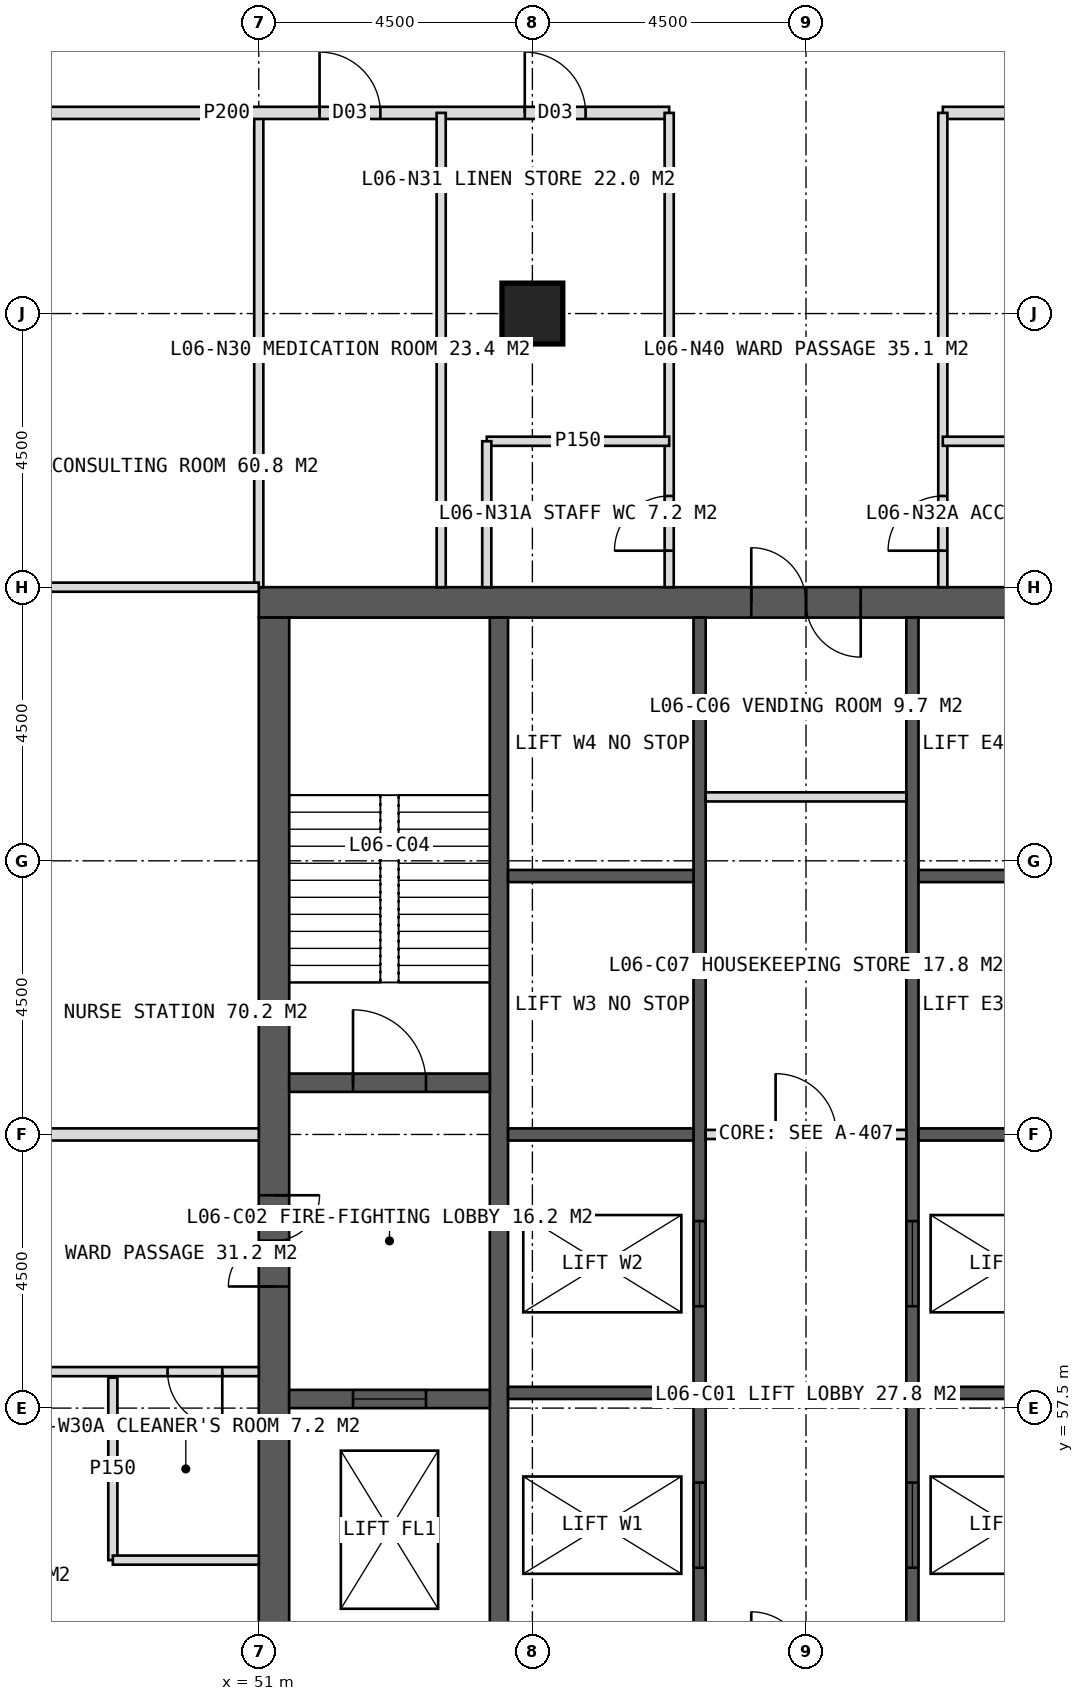
"""IFC4 building model, lengths in metres.
Left out: names, types, materials, properties, quantities, classifications, styles, units other than length and angle.
Written with IfcOpenShell. Run it as: python <this file> out.ifc"""

import sys

from ifc_helpers import new_model, si_unit, direction, frame, frame_2d, origin, origin_2d, place, context, subcontext, project, spatial, rectangle, hollow_rectangle, extrude, element, fill, save


model = new_model("IFC4")
c1 = context("Model", 3, precision=1e-05, world=origin(), true_north=direction((0.0, 1.0)))
c2 = subcontext(c1, "Body", "Model", "MODEL_VIEW")
j1 = project(units=[si_unit("LENGTHUNIT", "METRE"), si_unit("PLANEANGLEUNIT", "RADIAN")], contexts=[c1])
p1 = place(None, origin())
s1 = spatial("IfcSite", under=j1, at=p1, CompositionType="ELEMENT")
p2 = place(p1, origin())
s2 = spatial("IfcBuilding", under=s1, at=p2, CompositionType="ELEMENT")
p3 = place(p2, frame((0.0, 0.0, 31.0)))
s3 = spatial("IfcBuildingStorey", under=s2, at=p3, CompositionType="ELEMENT", Elevation=31.0)
p4 = place(p3, frame((51.0, 70.75, 0.0), z_axis=(0.0, 0.0, 1.0), x_axis=(1.0, 0.0, 0.0)))
e1 = element("IfcWall", 1, at=p4, inside=s3, PredefinedType="SHEAR", context=c2, shape_type="SweptSolid", body=[
    extrude(rectangle(XDim=18.0, YDim=0.5, at=frame_2d((9.0, 0.0))), origin(), (0.0, 0.0, 1.0), 4.0),
])
p5 = place(p4, frame((8.1, 0.0, 0.0)))
e2 = element("IfcOpeningElement", 2, at=p5, cuts=e1, PredefinedType="OPENING", context=c2, shape_type="SweptSolid", body=[
    extrude(rectangle(XDim=1.8, YDim=2.2, at=frame_2d((0.9, 1.1))), frame((0.0, 0.26, 0.0), z_axis=(0.0, -1.0, 0.0), x_axis=(1.0, 0.0, 0.0)), (0.0, 0.0, 1.0), 0.52),
])
p6 = place(p3, frame((51.25, 53.5, 0.0), z_axis=(0.0, 0.0, 1.0), x_axis=(0.0, 1.0, 0.0)))
e3 = element("IfcWall", 3, at=p6, inside=s3, PredefinedType="SHEAR", context=c2, shape_type="SweptSolid", body=[
    extrude(rectangle(XDim=17.0, YDim=0.5, at=frame_2d((8.5, 0.0))), origin(), (0.0, 0.0, 1.0), 4.0),
])
p7 = place(p6, frame((6.0, 0.0, 0.0)))
e4 = element("IfcOpeningElement", 4, at=p7, cuts=e3, PredefinedType="OPENING", context=c2, shape_type="SweptSolid", body=[
    extrude(rectangle(XDim=1.5, YDim=2.2, at=frame_2d((0.75, 1.1))), frame((0.0, 0.26, 0.0), z_axis=(0.0, -1.0, 0.0), x_axis=(1.0, 0.0, 0.0)), (0.0, 0.0, 1.0), 0.52),
])
p8 = place(p3, frame((54.95, 53.5, 0.0), z_axis=(0.0, 0.0, 1.0), x_axis=(0.0, 1.0, 0.0)))
e5 = element("IfcWall", 5, at=p8, inside=s3, PredefinedType="SHEAR", context=c2, shape_type="SweptSolid", body=[
    extrude(rectangle(XDim=17.0, YDim=0.3, at=frame_2d((8.5, 0.0))), origin(), (0.0, 0.0, 1.0), 4.0),
])
p9 = place(p3, frame((58.25, 53.5, 0.0), z_axis=(0.0, 0.0, 1.0), x_axis=(0.0, 1.0, 0.0)))
e6 = element("IfcWall", 6, at=p9, inside=s3, PredefinedType="SHEAR", context=c2, shape_type="SweptSolid", body=[
    extrude(rectangle(XDim=17.0, YDim=0.2, at=frame_2d((8.5, 0.0))), origin(), (0.0, 0.0, 1.0), 4.0),
])
p10 = place(p9, frame((1.375, 0.0, 0.0)))
e7 = element("IfcOpeningElement", 7, at=p10, cuts=e6, PredefinedType="OPENING", context=c2, shape_type="SweptSolid", body=[
    extrude(rectangle(XDim=1.4, YDim=2.2, at=frame_2d((0.7, 1.1))), frame((0.0, 0.11, 0.0), z_axis=(0.0, -1.0, 0.0), x_axis=(1.0, 0.0, 0.0)), (0.0, 0.0, 1.0), 0.22),
])
p11 = place(p9, frame((5.675, 0.0, 0.0)))
e8 = element("IfcOpeningElement", 8, at=p11, cuts=e6, PredefinedType="OPENING", context=c2, shape_type="SweptSolid", body=[
    extrude(rectangle(XDim=1.4, YDim=2.2, at=frame_2d((0.7, 1.1))), frame((0.0, 0.11, 0.0), z_axis=(0.0, -1.0, 0.0), x_axis=(1.0, 0.0, 0.0)), (0.0, 0.0, 1.0), 0.22),
])
p12 = place(p3, frame((61.75, 53.5, 0.0), z_axis=(0.0, 0.0, 1.0), x_axis=(0.0, 1.0, 0.0)))
e9 = element("IfcWall", 9, at=p12, inside=s3, PredefinedType="SHEAR", context=c2, shape_type="SweptSolid", body=[
    extrude(rectangle(XDim=17.0, YDim=0.2, at=frame_2d((8.5, 0.0))), origin(), (0.0, 0.0, 1.0), 4.0),
])
p13 = place(p12, frame((1.375, 0.0, 0.0)))
e10 = element("IfcOpeningElement", 10, at=p13, cuts=e9, PredefinedType="OPENING", context=c2, shape_type="SweptSolid", body=[
    extrude(rectangle(XDim=1.4, YDim=2.2, at=frame_2d((0.7, 1.1))), frame((0.0, 0.11, 0.0), z_axis=(0.0, -1.0, 0.0), x_axis=(1.0, 0.0, 0.0)), (0.0, 0.0, 1.0), 0.22),
])
p14 = place(p12, frame((5.675, 0.0, 0.0)))
e11 = element("IfcOpeningElement", 11, at=p14, cuts=e9, PredefinedType="OPENING", context=c2, shape_type="SweptSolid", body=[
    extrude(rectangle(XDim=1.4, YDim=2.2, at=frame_2d((0.7, 1.1))), frame((0.0, 0.11, 0.0), z_axis=(0.0, -1.0, 0.0), x_axis=(1.0, 0.0, 0.0)), (0.0, 0.0, 1.0), 0.22),
])
for number, where, z_axis, x_axis in (
    (12, (55.1, 57.75, 0.0), (0.0, 0.0, 1.0), (1.0, 0.0, 0.0)),
    (13, (61.85, 57.75, 0.0), (0.0, 0.0, 1.0), (1.0, 0.0, 0.0)),
    (14, (55.1, 62.0, 0.0), (0.0, 0.0, 1.0), (1.0, 0.0, 0.0)),
    (15, (61.85, 62.0, 0.0), (0.0, 0.0, 1.0), (1.0, 0.0, 0.0)),
    (16, (55.1, 66.25, 0.0), (0.0, 0.0, 1.0), (1.0, 0.0, 0.0)),
    (17, (61.85, 66.25, 0.0), (0.0, 0.0, 1.0), (1.0, 0.0, 0.0)),
):
    element("IfcWall", number, at=place(p3, frame(where, z_axis=z_axis, x_axis=x_axis)), inside=s3, PredefinedType="SHEAR", context=c2, shape_type="SweptSolid", body=[
        extrude(rectangle(XDim=3.05, YDim=0.2, at=frame_2d((1.525, 0.0))), origin(), (0.0, 0.0, 1.0), 4.0),
    ])
p15 = place(p3, frame((51.5, 62.85, 0.0), z_axis=(0.0, 0.0, 1.0), x_axis=(1.0, 0.0, 0.0)))
e18 = element("IfcWall", 18, at=p15, inside=s3, PredefinedType="SHEAR", context=c2, shape_type="SweptSolid", body=[
    extrude(rectangle(XDim=3.3, YDim=0.3, at=frame_2d((1.65, 0.0))), origin(), (0.0, 0.0, 1.0), 4.0),
])
p16 = place(p15, frame((1.05, 0.0, 0.0)))
e19 = element("IfcOpeningElement", 19, at=p16, cuts=e18, PredefinedType="OPENING", context=c2, shape_type="SweptSolid", body=[
    extrude(rectangle(XDim=1.2, YDim=2.1, at=frame_2d((0.6, 1.05))), frame((0.0, 0.16, 0.0), z_axis=(0.0, -1.0, 0.0), x_axis=(1.0, 0.0, 0.0)), (0.0, 0.0, 1.0), 0.32),
])
p17 = place(p3, frame((51.5, 57.65, 0.0), z_axis=(0.0, 0.0, 1.0), x_axis=(1.0, 0.0, 0.0)))
e20 = element("IfcWall", 20, at=p17, inside=s3, PredefinedType="SHEAR", context=c2, shape_type="SweptSolid", body=[
    extrude(rectangle(XDim=3.3, YDim=0.3, at=frame_2d((1.65, 0.0))), origin(), (0.0, 0.0, 1.0), 4.0),
])
p18 = place(p17, frame((1.05, 0.0, 0.0)))
e21 = element("IfcOpeningElement", 21, at=p18, cuts=e20, PredefinedType="OPENING", context=c2, shape_type="SweptSolid", body=[
    extrude(rectangle(XDim=1.2, YDim=2.2, at=frame_2d((0.6, 1.1))), frame((0.0, 0.16, 0.0), z_axis=(0.0, -1.0, 0.0), x_axis=(1.0, 0.0, 0.0)), (0.0, 0.0, 1.0), 0.32),
])
p19 = place(p3, frame((55.5, 75.5, 0.0), z_axis=(0.0, 0.0, 1.0), x_axis=(1.0, 0.0, 0.0)))
e22 = element("IfcColumn", 22, at=p19, inside=s3, PredefinedType="COLUMN", context=c2, shape_type="SweptSolid", body=[
    extrude(hollow_rectangle(XDim=1.0, YDim=1.0, WallThickness=0.1, at=origin_2d()), origin(), (0.0, 0.0, 1.0), 4.0),
])
p20 = place(p3, frame((51.0, 71.0, 0.0), z_axis=(0.0, 0.0, 1.0), x_axis=(0.0, 1.0, 0.0)))
e23 = element("IfcWall", 23, at=p20, inside=s3, PredefinedType="PARTITIONING", context=c2, shape_type="SweptSolid", body=[
    extrude(rectangle(XDim=7.8, YDim=0.15, at=frame_2d((3.9, 0.0))), origin(), (0.0, 0.0, 1.0), 3.75),
])
p21 = place(p3, frame((43.2, 78.8, 0.0), z_axis=(0.0, 0.0, 1.0), x_axis=(1.0, 0.0, 0.0)))
e24 = element("IfcWall", 24, at=p21, inside=s3, PredefinedType="PARTITIONING", context=c2, shape_type="SweptSolid", body=[
    extrude(rectangle(XDim=14.55, YDim=0.2, at=frame_2d((7.275, 0.0))), origin(), (0.0, 0.0, 1.0), 3.75),
])
p22 = place(p21, frame((8.8, 0.0, 0.0)))
e25 = element("IfcOpeningElement", 25, at=p22, cuts=e24, PredefinedType="OPENING", context=c2, shape_type="SweptSolid", body=[
    extrude(rectangle(XDim=1.0, YDim=2.1, at=frame_2d((0.5, 1.05))), frame((0.0, 0.11, 0.0), z_axis=(0.0, -1.0, 0.0), x_axis=(1.0, 0.0, 0.0)), (0.0, 0.0, 1.0), 0.22),
])
p23 = place(p21, frame((12.175, 0.0, 0.0)))
e26 = element("IfcOpeningElement", 26, at=p23, cuts=e24, PredefinedType="OPENING", context=c2, shape_type="SweptSolid", body=[
    extrude(rectangle(XDim=1.0, YDim=2.1, at=frame_2d((0.5, 1.05))), frame((0.0, 0.11, 0.0), z_axis=(0.0, -1.0, 0.0), x_axis=(1.0, 0.0, 0.0)), (0.0, 0.0, 1.0), 0.22),
])
p24 = place(p3, frame((62.25, 78.8, 0.0), z_axis=(0.0, 0.0, 1.0), x_axis=(1.0, 0.0, 0.0)))
e27 = element("IfcWall", 27, at=p24, inside=s3, PredefinedType="PARTITIONING", context=c2, shape_type="SweptSolid", body=[
    extrude(rectangle(XDim=6.75, YDim=0.2, at=frame_2d((3.375, 0.0))), origin(), (0.0, 0.0, 1.0), 3.75),
])
p25 = place(p24, frame((2.875, 0.0, 0.0)))
e28 = element("IfcOpeningElement", 28, at=p25, cuts=e27, PredefinedType="OPENING", context=c2, shape_type="SweptSolid", body=[
    extrude(rectangle(XDim=1.0, YDim=2.1, at=frame_2d((0.5, 1.05))), frame((0.0, 0.11, 0.0), z_axis=(0.0, -1.0, 0.0), x_axis=(1.0, 0.0, 0.0)), (0.0, 0.0, 1.0), 0.22),
])
p26 = place(p3, frame((57.75, 71.0, 0.0), z_axis=(0.0, 0.0, 1.0), x_axis=(0.0, 1.0, 0.0)))
e29 = element("IfcWall", 29, at=p26, inside=s3, PredefinedType="PARTITIONING", context=c2, shape_type="SweptSolid", body=[
    extrude(rectangle(XDim=7.8, YDim=0.15, at=frame_2d((3.9, 0.0))), origin(), (0.0, 0.0, 1.0), 3.75),
])
p27 = place(p26, frame((0.6, 0.0, 0.0)))
e30 = element("IfcOpeningElement", 30, at=p27, cuts=e29, PredefinedType="OPENING", context=c2, shape_type="SweptSolid", body=[
    extrude(rectangle(XDim=0.9, YDim=2.1, at=frame_2d((0.45, 1.05))), frame((0.0, 0.085, 0.0), z_axis=(0.0, -1.0, 0.0), x_axis=(1.0, 0.0, 0.0)), (0.0, 0.0, 1.0), 0.17),
])
p28 = place(p3, frame((62.25, 71.0, 0.0), z_axis=(0.0, 0.0, 1.0), x_axis=(0.0, 1.0, 0.0)))
e31 = element("IfcWall", 31, at=p28, inside=s3, PredefinedType="PARTITIONING", context=c2, shape_type="SweptSolid", body=[
    extrude(rectangle(XDim=7.8, YDim=0.15, at=frame_2d((3.9, 0.0))), origin(), (0.0, 0.0, 1.0), 3.75),
])
p29 = place(p28, frame((0.6, 0.0, 0.0)))
e32 = element("IfcOpeningElement", 32, at=p29, cuts=e31, PredefinedType="OPENING", context=c2, shape_type="SweptSolid", body=[
    extrude(rectangle(XDim=0.9, YDim=2.1, at=frame_2d((0.45, 1.05))), frame((0.0, 0.085, 0.0), z_axis=(0.0, -1.0, 0.0), x_axis=(1.0, 0.0, 0.0)), (0.0, 0.0, 1.0), 0.17),
])
p30 = place(p3, frame((54.0, 71.0, 0.0), z_axis=(0.0, 0.0, 1.0), x_axis=(0.0, 1.0, 0.0)))
e33 = element("IfcWall", 33, at=p30, inside=s3, PredefinedType="PARTITIONING", context=c2, shape_type="SweptSolid", body=[
    extrude(rectangle(XDim=7.8, YDim=0.15, at=frame_2d((3.9, 0.0))), origin(), (0.0, 0.0, 1.0), 3.75),
])
p31 = place(p3, frame((54.75, 73.4, 0.0), z_axis=(0.0, 0.0, 1.0), x_axis=(1.0, 0.0, 0.0)))
e34 = element("IfcWall", 34, at=p31, inside=s3, PredefinedType="PARTITIONING", context=c2, shape_type="SweptSolid", body=[
    extrude(rectangle(XDim=3.0, YDim=0.15, at=frame_2d((1.5, 0.0))), origin(), (0.0, 0.0, 1.0), 3.75),
])
p32 = place(p3, frame((54.75, 71.0, 0.0), z_axis=(0.0, 0.0, 1.0), x_axis=(0.0, 1.0, 0.0)))
e35 = element("IfcWall", 35, at=p32, inside=s3, PredefinedType="PARTITIONING", context=c2, shape_type="SweptSolid", body=[
    extrude(rectangle(XDim=2.4, YDim=0.15, at=frame_2d((1.2, 0.0))), origin(), (0.0, 0.0, 1.0), 3.75),
])
p33 = place(p3, frame((62.25, 73.4, 0.0), z_axis=(0.0, 0.0, 1.0), x_axis=(1.0, 0.0, 0.0)))
e36 = element("IfcWall", 36, at=p33, inside=s3, PredefinedType="PARTITIONING", context=c2, shape_type="SweptSolid", body=[
    extrude(rectangle(XDim=3.0, YDim=0.15, at=frame_2d((1.5, 0.0))), origin(), (0.0, 0.0, 1.0), 3.75),
])
p34 = place(p3, frame((51.0, 58.1, 0.0), z_axis=(0.0, 0.0, 1.0), x_axis=(-1.0, 0.0, 0.0)))
e37 = element("IfcWall", 37, at=p34, inside=s3, PredefinedType="PARTITIONING", context=c2, shape_type="SweptSolid", body=[
    extrude(rectangle(XDim=7.8, YDim=0.15, at=frame_2d((3.9, 0.0))), origin(), (0.0, 0.0, 1.0), 3.75),
])
p35 = place(p34, frame((0.6, 0.0, 0.0)))
e38 = element("IfcOpeningElement", 38, at=p35, cuts=e37, PredefinedType="OPENING", context=c2, shape_type="SweptSolid", body=[
    extrude(rectangle(XDim=0.9, YDim=2.1, at=frame_2d((0.45, 1.05))), frame((0.0, 0.085, 0.0), z_axis=(0.0, -1.0, 0.0), x_axis=(1.0, 0.0, 0.0)), (0.0, 0.0, 1.0), 0.17),
])
p36 = place(p3, frame((51.0, 62.0, 0.0), z_axis=(0.0, 0.0, 1.0), x_axis=(-1.0, 0.0, 0.0)))
e39 = element("IfcWall", 39, at=p36, inside=s3, PredefinedType="SOLIDWALL", context=c2, shape_type="SweptSolid", body=[
    extrude(rectangle(XDim=7.8, YDim=0.2, at=frame_2d((3.9, 0.0))), origin(), (0.0, 0.0, 1.0), 2.75),
])
p37 = place(p3, frame((51.0, 71.0, 0.0), z_axis=(0.0, 0.0, 1.0), x_axis=(-1.0, 0.0, 0.0)))
e40 = element("IfcWall", 40, at=p37, inside=s3, PredefinedType="PARTITIONING", context=c2, shape_type="SweptSolid", body=[
    extrude(rectangle(XDim=7.8, YDim=0.15, at=frame_2d((3.9, 0.0))), origin(), (0.0, 0.0, 1.0), 3.75),
])
p38 = place(p3, frame((48.6, 55.0, 0.0), z_axis=(0.0, 0.0, 1.0), x_axis=(0.0, 1.0, 0.0)))
e41 = element("IfcWall", 41, at=p38, inside=s3, PredefinedType="PARTITIONING", context=c2, shape_type="SweptSolid", body=[
    extrude(rectangle(XDim=3.0, YDim=0.15, at=frame_2d((1.5, 0.0))), origin(), (0.0, 0.0, 1.0), 3.75),
])
p39 = place(p3, frame((51.0, 55.0, 0.0), z_axis=(0.0, 0.0, 1.0), x_axis=(-1.0, 0.0, 0.0)))
e42 = element("IfcWall", 42, at=p39, inside=s3, PredefinedType="PARTITIONING", context=c2, shape_type="SweptSolid", body=[
    extrude(rectangle(XDim=2.4, YDim=0.15, at=frame_2d((1.2, 0.0))), origin(), (0.0, 0.0, 1.0), 3.75),
])
p40 = place(p3, frame((58.35, 62.0, 0.0), z_axis=(0.0, 0.0, 1.0), x_axis=(1.0, 0.0, 0.0)))
e43 = element("IfcWall", 43, at=p40, inside=s3, PredefinedType="PARTITIONING", context=c2, shape_type="SweptSolid", body=[
    extrude(rectangle(XDim=3.3, YDim=0.15, at=frame_2d((1.65, 0.0))), origin(), (0.0, 0.0, 1.0), 3.75),
])
p41 = place(p40, frame((1.15, 0.0, 0.0)))
e44 = element("IfcOpeningElement", 44, at=p41, cuts=e43, PredefinedType="OPENING", context=c2, shape_type="SweptSolid", body=[
    extrude(rectangle(XDim=1.0, YDim=2.1, at=frame_2d((0.5, 1.05))), frame((0.0, 0.085, 0.0), z_axis=(0.0, -1.0, 0.0), x_axis=(1.0, 0.0, 0.0)), (0.0, 0.0, 1.0), 0.17),
])
p42 = place(p3, frame((58.35, 67.551, 0.0), z_axis=(0.0, 0.0, 1.0), x_axis=(1.0, 0.0, 0.0)))
e45 = element("IfcWall", 45, at=p42, inside=s3, PredefinedType="PARTITIONING", context=c2, shape_type="SweptSolid", body=[
    extrude(rectangle(XDim=3.3, YDim=0.15, at=frame_2d((1.65, 0.0))), origin(), (0.0, 0.0, 1.0), 3.75),
])
p43 = place(p22, origin())
e46 = element("IfcDoor", 46, at=p43, inside=s3, OperationType="SINGLE_SWING_LEFT", PredefinedType="DOOR", context=c2, shape_type="SweptSolid", body=[
    extrude(rectangle(XDim=1.0, YDim=2.1, at=frame_2d((0.5, 1.05))), frame((0.0, 0.025, 0.0), z_axis=(0.0, -1.0, 0.0), x_axis=(1.0, 0.0, 0.0)), (0.0, 0.0, 1.0), 0.05),
])
fill(e25, e46)
p44 = place(p27, origin())
e47 = element("IfcDoor", 47, at=p44, inside=s3, OperationType="SINGLE_SWING_LEFT", PredefinedType="DOOR", context=c2, shape_type="SweptSolid", body=[
    extrude(rectangle(XDim=0.9, YDim=2.1, at=frame_2d((0.45, 1.05))), frame((0.0, 0.025, 0.0), z_axis=(0.0, -1.0, 0.0), x_axis=(1.0, 0.0, 0.0)), (0.0, 0.0, 1.0), 0.05),
])
fill(e30, e47)
p45 = place(p23, origin())
e48 = element("IfcDoor", 48, at=p45, inside=s3, OperationType="SINGLE_SWING_LEFT", PredefinedType="DOOR", context=c2, shape_type="SweptSolid", body=[
    extrude(rectangle(XDim=1.0, YDim=2.1, at=frame_2d((0.5, 1.05))), frame((0.0, 0.025, 0.0), z_axis=(0.0, -1.0, 0.0), x_axis=(1.0, 0.0, 0.0)), (0.0, 0.0, 1.0), 0.05),
])
fill(e26, e48)
p46 = place(p29, origin())
e49 = element("IfcDoor", 49, at=p46, inside=s3, OperationType="SINGLE_SWING_LEFT", PredefinedType="DOOR", context=c2, shape_type="SweptSolid", body=[
    extrude(rectangle(XDim=0.9, YDim=2.1, at=frame_2d((0.45, 1.05))), frame((0.0, 0.025, 0.0), z_axis=(0.0, -1.0, 0.0), x_axis=(1.0, 0.0, 0.0)), (0.0, 0.0, 1.0), 0.05),
])
fill(e32, e49)
p47 = place(p35, origin())
e50 = element("IfcDoor", 50, at=p47, inside=s3, OperationType="SINGLE_SWING_LEFT", PredefinedType="DOOR", context=c2, shape_type="SweptSolid", body=[
    extrude(rectangle(XDim=0.9, YDim=2.1, at=frame_2d((0.45, 1.05))), frame((0.0, 0.025, 0.0), z_axis=(0.0, -1.0, 0.0), x_axis=(1.0, 0.0, 0.0)), (0.0, 0.0, 1.0), 0.05),
])
fill(e38, e50)
p48 = place(p7, origin())
e51 = element("IfcDoor", 51, at=p48, inside=s3, OperationType="DOUBLE_DOOR_SINGLE_SWING", PredefinedType="DOOR", context=c2, shape_type="SweptSolid", body=[
    extrude(rectangle(XDim=1.5, YDim=2.2, at=frame_2d((0.75, 1.1))), frame((0.0, 0.025, 0.0), z_axis=(0.0, -1.0, 0.0), x_axis=(1.0, 0.0, 0.0)), (0.0, 0.0, 1.0), 0.05),
])
fill(e4, e51)
p49 = place(p16, origin())
e52 = element("IfcDoor", 52, at=p49, inside=s3, OperationType="SINGLE_SWING_LEFT", PredefinedType="DOOR", context=c2, shape_type="SweptSolid", body=[
    extrude(rectangle(XDim=1.2, YDim=2.1, at=frame_2d((0.6, 1.05))), frame((0.0, 0.025, 0.0), z_axis=(0.0, -1.0, 0.0), x_axis=(1.0, 0.0, 0.0)), (0.0, 0.0, 1.0), 0.05),
])
fill(e19, e52)
p50 = place(p18, origin())
e53 = element("IfcDoor", 53, at=p50, inside=s3, OperationType="SLIDING_TO_LEFT", PredefinedType="DOOR", context=c2, shape_type="SweptSolid", body=[
    extrude(rectangle(XDim=1.2, YDim=2.2, at=frame_2d((0.6, 1.1))), frame((0.0, 0.025, 0.0), z_axis=(0.0, -1.0, 0.0), x_axis=(1.0, 0.0, 0.0)), (0.0, 0.0, 1.0), 0.05),
])
fill(e21, e53)
p51 = place(p10, origin())
e54 = element("IfcDoor", 54, at=p51, inside=s3, OperationType="SLIDING_TO_LEFT", PredefinedType="DOOR", context=c2, shape_type="SweptSolid", body=[
    extrude(rectangle(XDim=1.4, YDim=2.2, at=frame_2d((0.7, 1.1))), frame((0.0, 0.025, 0.0), z_axis=(0.0, -1.0, 0.0), x_axis=(1.0, 0.0, 0.0)), (0.0, 0.0, 1.0), 0.05),
])
fill(e7, e54)
p52 = place(p13, origin())
e55 = element("IfcDoor", 55, at=p52, inside=s3, OperationType="SLIDING_TO_LEFT", PredefinedType="DOOR", context=c2, shape_type="SweptSolid", body=[
    extrude(rectangle(XDim=1.4, YDim=2.2, at=frame_2d((0.7, 1.1))), frame((0.0, 0.025, 0.0), z_axis=(0.0, -1.0, 0.0), x_axis=(1.0, 0.0, 0.0)), (0.0, 0.0, 1.0), 0.05),
])
fill(e10, e55)
p53 = place(p11, origin())
e56 = element("IfcDoor", 56, at=p53, inside=s3, OperationType="SLIDING_TO_LEFT", PredefinedType="DOOR", context=c2, shape_type="SweptSolid", body=[
    extrude(rectangle(XDim=1.4, YDim=2.2, at=frame_2d((0.7, 1.1))), frame((0.0, 0.025, 0.0), z_axis=(0.0, -1.0, 0.0), x_axis=(1.0, 0.0, 0.0)), (0.0, 0.0, 1.0), 0.05),
])
fill(e8, e56)
p54 = place(p14, origin())
e57 = element("IfcDoor", 57, at=p54, inside=s3, OperationType="SLIDING_TO_LEFT", PredefinedType="DOOR", context=c2, shape_type="SweptSolid", body=[
    extrude(rectangle(XDim=1.4, YDim=2.2, at=frame_2d((0.7, 1.1))), frame((0.0, 0.025, 0.0), z_axis=(0.0, -1.0, 0.0), x_axis=(1.0, 0.0, 0.0)), (0.0, 0.0, 1.0), 0.05),
])
fill(e11, e57)
p55 = place(p41, origin())
e58 = element("IfcDoor", 58, at=p55, inside=s3, OperationType="SINGLE_SWING_LEFT", PredefinedType="DOOR", context=c2, shape_type="SweptSolid", body=[
    extrude(rectangle(XDim=1.0, YDim=2.1, at=frame_2d((0.5, 1.05))), frame((0.0, 0.025, 0.0), z_axis=(0.0, -1.0, 0.0), x_axis=(1.0, 0.0, 0.0)), (0.0, 0.0, 1.0), 0.05),
])
fill(e44, e58)
p56 = place(p5, origin())
e59 = element("IfcDoor", 59, at=p56, inside=s3, OperationType="DOUBLE_DOOR_SINGLE_SWING", PredefinedType="DOOR", context=c2, shape_type="SweptSolid", body=[
    extrude(rectangle(XDim=1.8, YDim=2.2, at=frame_2d((0.9, 1.1))), frame((0.0, 0.025, 0.0), z_axis=(0.0, -1.0, 0.0), x_axis=(1.0, 0.0, 0.0)), (0.0, 0.0, 1.0), 0.05),
])
fill(e2, e59)
save(model, sys.argv[1])
